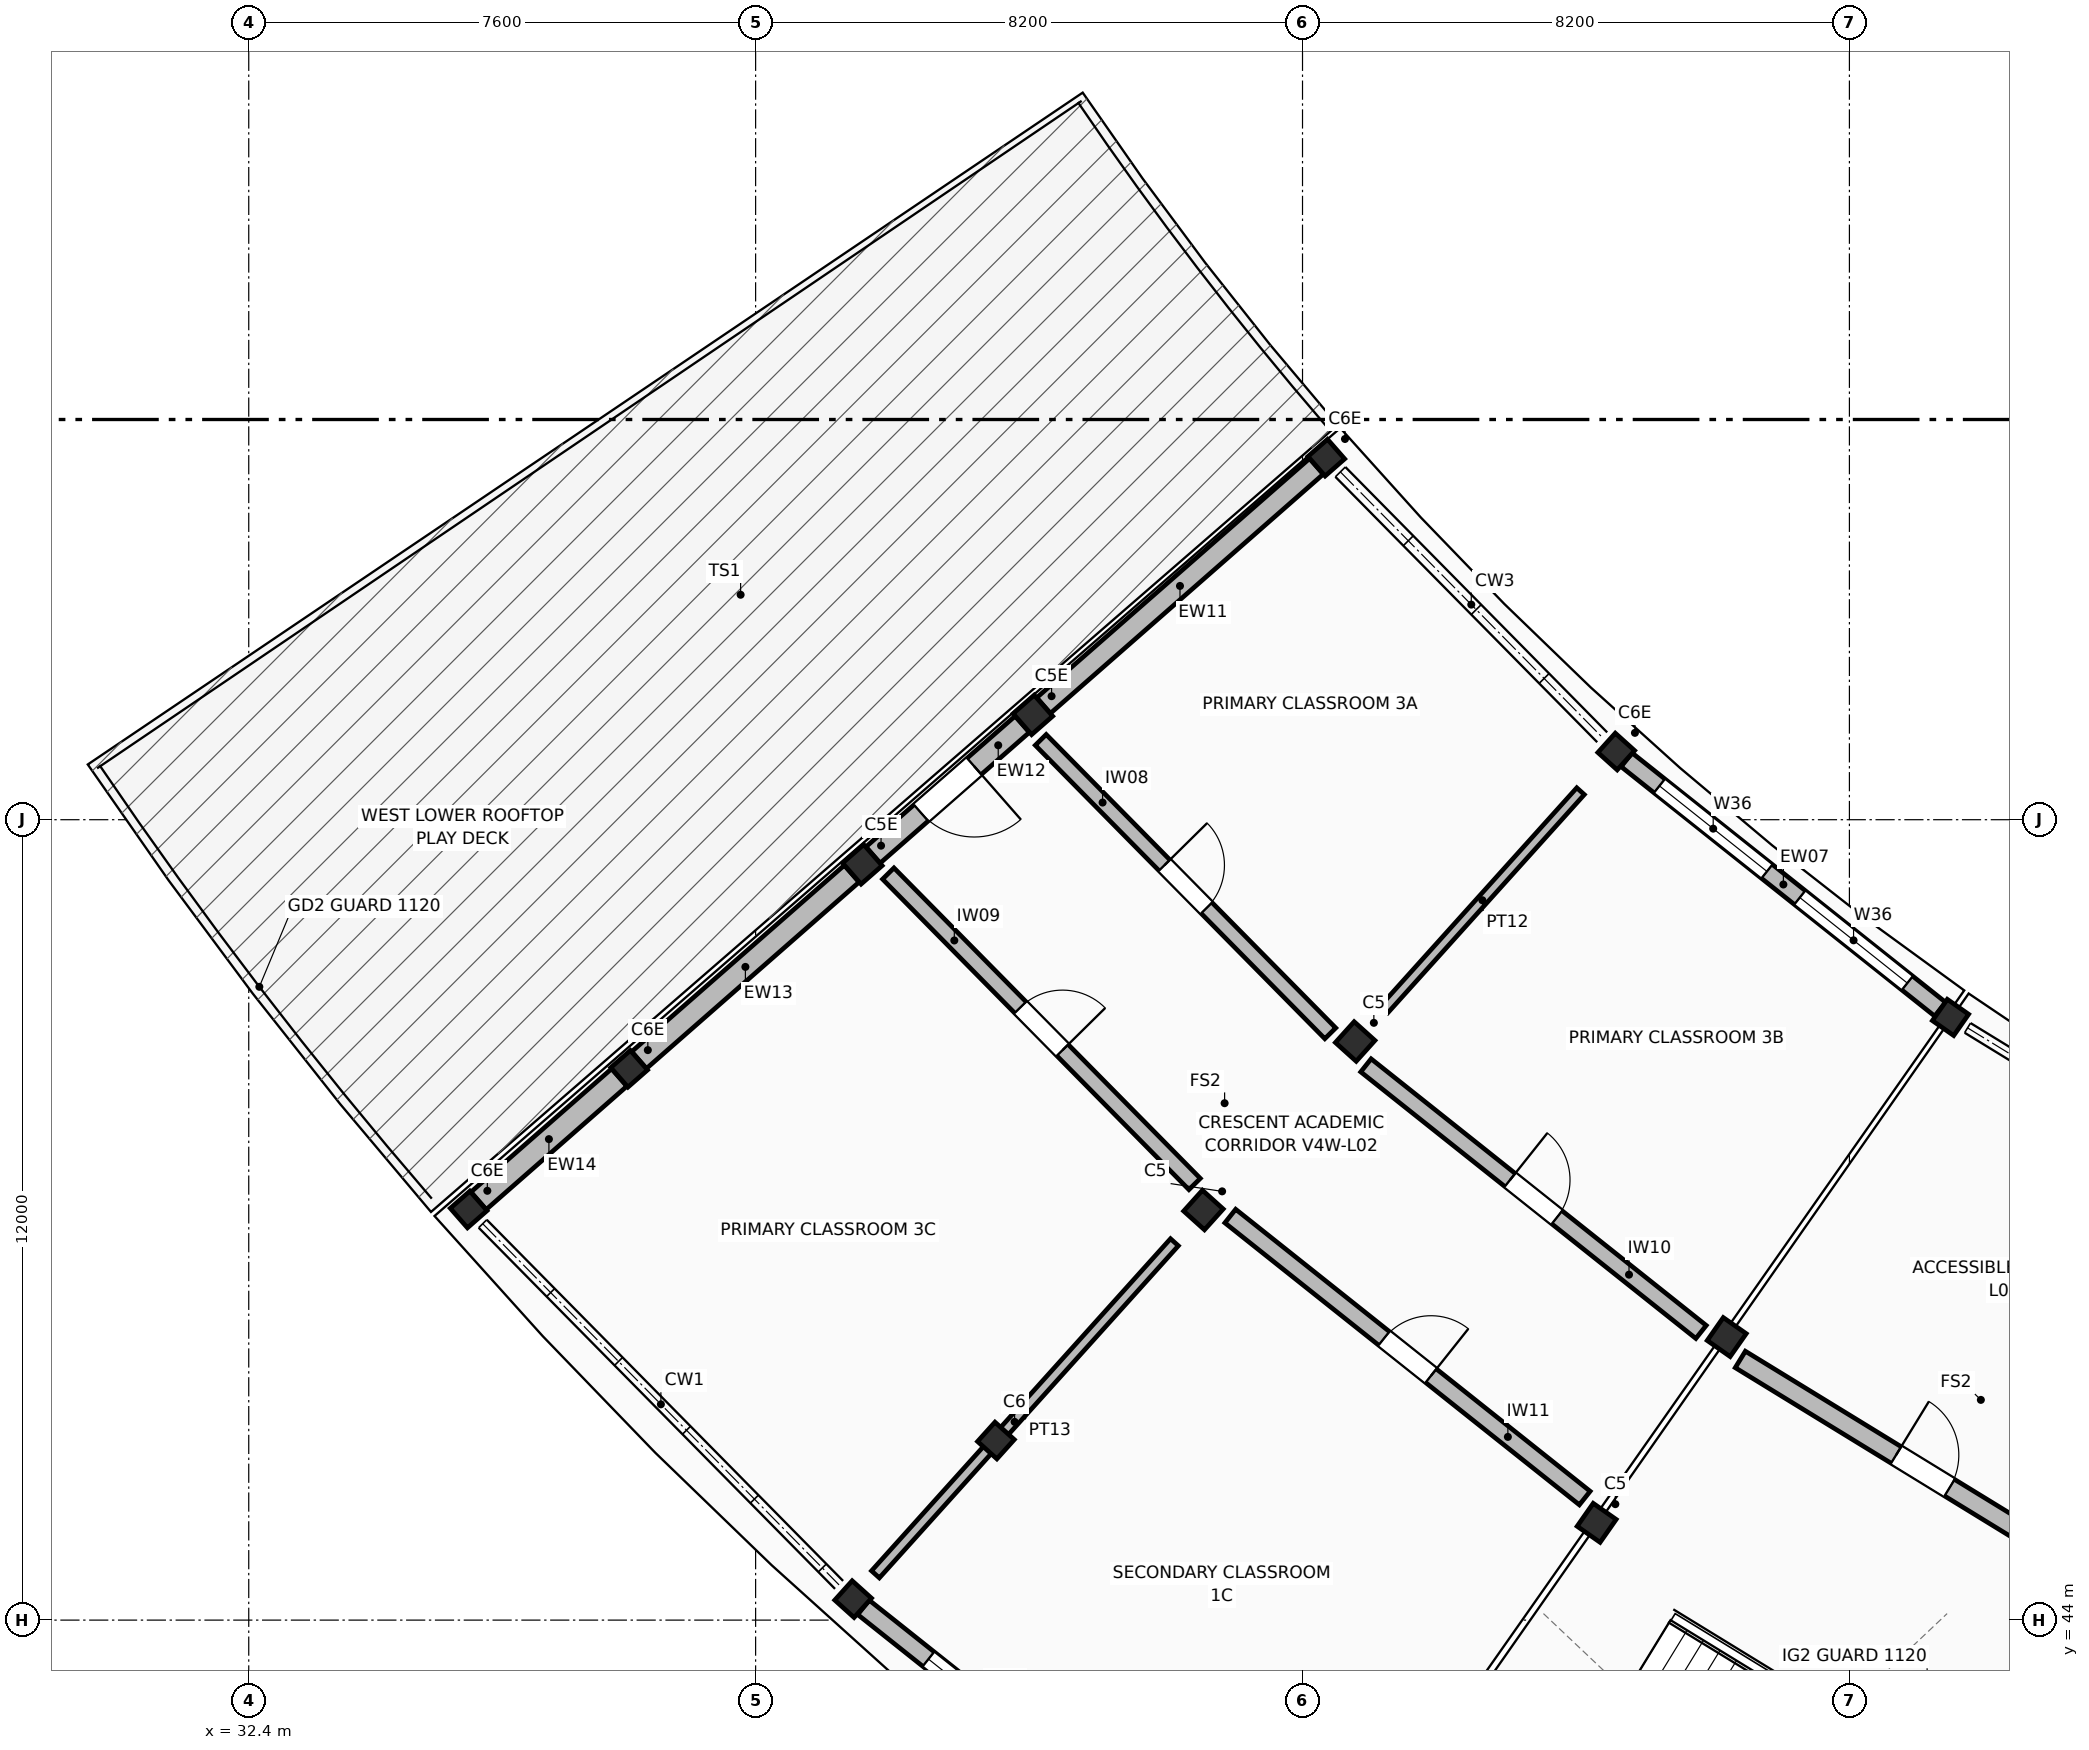
"""IFC4 building model, lengths in metres.
Left out: names, types, materials, properties, quantities, classifications, styles, units other than length and angle.
Written with IfcOpenShell. Run it as: python <this file> out.ifc"""

import sys

from ifc_helpers import new_model, si_unit, direction, frame, frame_2d, origin, origin_2d, place, context, subcontext, project, spatial, rectangle, extrude, element, fill, save


model = new_model("IFC4")
c1 = context("Model", 3, precision=1e-05, world=origin(), true_north=direction((0.0, 1.0)))
c2 = subcontext(c1, "Body", "Model", "MODEL_VIEW")
j1 = project(units=[si_unit("LENGTHUNIT", "METRE"), si_unit("PLANEANGLEUNIT", "RADIAN")], contexts=[c1])
p1 = place(None, origin())
s1 = spatial("IfcSite", under=j1, at=p1, CompositionType="ELEMENT")
p2 = place(p1, origin())
s2 = spatial("IfcBuilding", under=s1, at=p2, CompositionType="ELEMENT")
p3 = place(p2, frame((0.0, 0.0, 8.16)))
s3 = spatial("IfcBuildingStorey", under=s2, at=p3, CompositionType="ELEMENT", Elevation=8.16)
p4 = place(p3, frame((48.557, 61.428, 0.0), z_axis=(0.0, 0.0, 1.0), x_axis=(-0.752069916777, -0.659083333334, 0.0)))
e1 = element("IfcColumn", 1, at=p4, inside=s3, PredefinedType="COLUMN", context=c2, shape_type="SweptSolid", body=[
    extrude(rectangle(XDim=0.39, YDim=0.39, at=origin_2d()), origin(), (0.0, 0.0, 1.0), 3.74),
])
for number, where, z_axis, x_axis in (
    (2, (44.157, 57.572, 0.0), (0.0, 0.0, 1.0), (-0.752, -0.659, 0.0)),
    (3, (41.601, 55.331, 0.0), (0.0, 0.0, 1.0), (-0.752, -0.659, 0.0)),
):
    element("IfcColumn", number, at=place(p3, frame(where, z_axis=z_axis, x_axis=x_axis)), inside=s3, PredefinedType="COLUMN", context=c2, shape_type="SweptSolid", body=[
        extrude(rectangle(XDim=0.42, YDim=0.42, at=origin_2d()), origin(), (0.0, 0.0, 1.0), 3.74),
    ])
for number, where, z_axis, x_axis in (
    (4, (38.104, 52.266, 0.0), (0.0, 0.0, 1.0), (-0.752, -0.659, 0.0)),
    (5, (35.698, 50.156, 0.0), (0.0, 0.0, 1.0), (-0.752, -0.659, 0.0)),
    (6, (52.904, 57.022, 0.0), (0.0, 0.0, 1.0), (-0.669, -0.743, 0.0)),
):
    element("IfcColumn", number, at=place(p3, frame(where, z_axis=z_axis, x_axis=x_axis)), inside=s3, PredefinedType="COLUMN", context=c2, shape_type="SweptSolid", body=[
        extrude(rectangle(XDim=0.39, YDim=0.39, at=origin_2d()), origin(), (0.0, 0.0, 1.0), 3.74),
    ])
for number, where, z_axis, x_axis in (
    (7, (48.99, 52.675, 0.0), (0.0, 0.0, 1.0), (-0.669, -0.743, 0.0)),
    (8, (46.715, 50.148, 0.0), (0.0, 0.0, 1.0), (-0.669, -0.743, 0.0)),
):
    element("IfcColumn", number, at=place(p3, frame(where, z_axis=z_axis, x_axis=x_axis)), inside=s3, PredefinedType="COLUMN", context=c2, shape_type="SweptSolid", body=[
        extrude(rectangle(XDim=0.42, YDim=0.42, at=origin_2d()), origin(), (0.0, 0.0, 1.0), 3.74),
    ])
for number, where, z_axis, x_axis in (
    (9, (43.603, 46.692, 0.0), (0.0, 0.0, 1.0), (-0.669, -0.743, 0.0)),
    (10, (41.462, 44.314, 0.0), (0.0, 0.0, 1.0), (-0.669, -0.743, 0.0)),
    (11, (57.916, 53.035, 0.0), (0.0, 0.0, 1.0), (-0.574, -0.819, 0.0)),
):
    element("IfcColumn", number, at=place(p3, frame(where, z_axis=z_axis, x_axis=x_axis)), inside=s3, PredefinedType="COLUMN", context=c2, shape_type="SweptSolid", body=[
        extrude(rectangle(XDim=0.39, YDim=0.39, at=origin_2d()), origin(), (0.0, 0.0, 1.0), 3.74),
    ])
for number, where, z_axis, x_axis in (
    (12, (54.561, 48.243, 0.0), (0.0, 0.0, 1.0), (-0.574, -0.819, 0.0)),
    (13, (52.61, 45.458, 0.0), (0.0, 0.0, 1.0), (-0.574, -0.819, 0.0)),
):
    element("IfcColumn", number, at=place(p3, frame(where, z_axis=z_axis, x_axis=x_axis)), inside=s3, PredefinedType="COLUMN", context=c2, shape_type="SweptSolid", body=[
        extrude(rectangle(XDim=0.42, YDim=0.42, at=origin_2d()), origin(), (0.0, 0.0, 1.0), 3.74),
    ])
p5 = place(p3, frame((53.059, 56.899, 0.0), z_axis=(0.0, 0.0, 1.0), x_axis=(0.78261410235, -0.622507162049, 0.0)))
e14 = element("IfcWall", 14, at=p5, inside=s3, PredefinedType="STANDARD", context=c2, shape_type="SweptSolid", body=[
    extrude(rectangle(XDim=6.008, YDim=0.264, at=frame_2d((3.004, 0.0))), origin(), (0.0, 0.0, 1.0), 2.78),
])
p6 = place(p5, frame((0.629, 0.0, 0.95)))
e15 = element("IfcOpeningElement", 15, at=p6, cuts=e14, PredefinedType="OPENING", context=c2, shape_type="SweptSolid", body=[
    extrude(rectangle(XDim=2.06, YDim=1.6, at=frame_2d((1.03, 0.8))), frame((0.0, 0.142, 0.0), z_axis=(0.0, -1.0, 0.0), x_axis=(1.0, 0.0, 0.0)), (0.0, 0.0, 1.0), 0.284),
])
p7 = place(p5, frame((3.319, 0.0, 0.95)))
e16 = element("IfcOpeningElement", 16, at=p7, cuts=e14, PredefinedType="OPENING", context=c2, shape_type="SweptSolid", body=[
    extrude(rectangle(XDim=2.06, YDim=1.6, at=frame_2d((1.03, 0.8))), frame((0.0, 0.142, 0.0), z_axis=(0.0, -1.0, 0.0), x_axis=(1.0, 0.0, 0.0)), (0.0, 0.0, 1.0), 0.284),
])
p8 = place(p3, frame((41.617, 44.191, 0.0), z_axis=(0.0, 0.0, 1.0), x_axis=(0.782610403329, -0.62251181242, 0.0)))
e17 = element("IfcWall", 17, at=p8, inside=s3, PredefinedType="STANDARD", context=c2, shape_type="SweptSolid", body=[
    extrude(rectangle(XDim=8.096, YDim=0.276, at=frame_2d((4.048, 0.0))), origin(), (0.0, 0.0, 1.0), 2.78),
])
p9 = place(p8, frame((1.245, 0.0, 0.95)))
e18 = element("IfcOpeningElement", 18, at=p9, cuts=e17, PredefinedType="OPENING", context=c2, shape_type="SweptSolid", body=[
    extrude(rectangle(XDim=2.18, YDim=1.15, at=frame_2d((1.09, 0.575))), frame((0.0, 0.148, 0.0), z_axis=(0.0, -1.0, 0.0), x_axis=(1.0, 0.0, 0.0)), (0.0, 0.0, 1.0), 0.296),
])
p10 = place(p8, frame((4.671, 0.0, 0.95)))
e19 = element("IfcOpeningElement", 19, at=p10, cuts=e17, PredefinedType="OPENING", context=c2, shape_type="SweptSolid", body=[
    extrude(rectangle(XDim=2.18, YDim=1.15, at=frame_2d((1.09, 0.575))), frame((0.0, 0.148, 0.0), z_axis=(0.0, -1.0, 0.0), x_axis=(1.0, 0.0, 0.0)), (0.0, 0.0, 1.0), 0.296),
])
p11 = place(p3, frame((48.408, 61.297, 0.0), z_axis=(0.0, 0.0, 1.0), x_axis=(-0.752014754072, -0.65914627334, 0.0)))
e20 = element("IfcWall", 20, at=p11, inside=s3, PredefinedType="STANDARD", context=c2, shape_type="SweptSolid", body=[
    extrude(rectangle(XDim=5.439, YDim=0.312, at=frame_2d((2.72, 0.0))), origin(), (0.0, 0.0, 1.0), 2.78),
])
p12 = place(p3, frame((43.997, 57.431, 0.0), z_axis=(0.0, 0.0, 1.0), x_axis=(-0.751966127371, -0.659201747029, 0.0)))
e21 = element("IfcWall", 21, at=p12, inside=s3, PredefinedType="STANDARD", context=c2, shape_type="SweptSolid", body=[
    extrude(rectangle(XDim=2.974, YDim=0.324, at=frame_2d((1.487, 0.0))), origin(), (0.0, 0.0, 1.0), 2.78),
])
p13 = place(p12, frame((0.957, 0.0, 0.0)))
e22 = element("IfcOpeningElement", 22, at=p13, cuts=e21, PredefinedType="OPENING", context=c2, shape_type="SweptSolid", body=[
    extrude(rectangle(XDim=1.06, YDim=2.18, at=frame_2d((0.53, 1.09))), frame((0.0, 0.172, 0.0), z_axis=(0.0, -1.0, 0.0), x_axis=(1.0, 0.0, 0.0)), (0.0, 0.0, 1.0), 0.344),
])
p14 = place(p3, frame((41.44, 55.19, 0.0), z_axis=(0.0, 0.0, 1.0), x_axis=(-0.752030548673, -0.659128252969, 0.0)))
e23 = element("IfcWall", 23, at=p14, inside=s3, PredefinedType="STANDARD", context=c2, shape_type="SweptSolid", body=[
    extrude(rectangle(XDim=4.239, YDim=0.336, at=frame_2d((2.119, 0.0))), origin(), (0.0, 0.0, 1.0), 2.78),
])
p15 = place(p3, frame((37.955, 52.135, 0.0), z_axis=(0.0, 0.0, 1.0), x_axis=(-0.752031665926, -0.65912697824, 0.0)))
e24 = element("IfcWall", 24, at=p15, inside=s3, PredefinedType="STANDARD", context=c2, shape_type="SweptSolid", body=[
    extrude(rectangle(XDim=2.804, YDim=0.348, at=frame_2d((1.402, 0.0))), origin(), (0.0, 0.0, 1.0), 2.78),
])
p16 = place(p3, frame((44.275, 57.197, 0.0), z_axis=(0.0, 0.0, 1.0), x_axis=(0.702370898593, -0.7118111553, 0.0)))
e25 = element("IfcWall", 25, at=p16, inside=s3, PredefinedType="STANDARD", context=c2, shape_type="SweptSolid", body=[
    extrude(rectangle(XDim=6.181, YDim=0.23, at=frame_2d((3.09, 0.0))), origin(), (0.0, 0.0, 1.0), 2.75),
])
p17 = place(p16, frame((2.64, 0.0, 0.0)))
e26 = element("IfcOpeningElement", 26, at=p17, cuts=e25, PredefinedType="OPENING", context=c2, shape_type="SweptSolid", body=[
    extrude(rectangle(XDim=0.9, YDim=2.06, at=frame_2d((0.45, 1.03))), frame((0.0, 0.125, 0.0), z_axis=(0.0, -1.0, 0.0), x_axis=(1.0, 0.0, 0.0)), (0.0, 0.0, 1.0), 0.25),
])
p18 = place(p3, frame((41.989, 55.193, 0.0), z_axis=(0.0, 0.0, 1.0), x_axis=(0.702368484449, -0.711813537419, 0.0)))
e27 = element("IfcWall", 27, at=p18, inside=s3, PredefinedType="STANDARD", context=c2, shape_type="SweptSolid", body=[
    extrude(rectangle(XDim=6.54, YDim=0.24, at=frame_2d((3.27, 0.0))), origin(), (0.0, 0.0, 1.0), 2.75),
])
p19 = place(p18, frame((2.82, 0.0, 0.0)))
e28 = element("IfcOpeningElement", 28, at=p19, cuts=e27, PredefinedType="OPENING", context=c2, shape_type="SweptSolid", body=[
    extrude(rectangle(XDim=0.9, YDim=2.12, at=frame_2d((0.45, 1.06))), frame((0.0, 0.13, 0.0), z_axis=(0.0, -1.0, 0.0), x_axis=(1.0, 0.0, 0.0)), (0.0, 0.0, 1.0), 0.26),
])
p20 = place(p3, frame((49.151, 52.317, 0.0), z_axis=(0.0, 0.0, 1.0), x_axis=(0.782605685559, -0.622517743467, 0.0)))
e29 = element("IfcWall", 29, at=p20, inside=s3, PredefinedType="STANDARD", context=c2, shape_type="SweptSolid", body=[
    extrude(rectangle(XDim=6.42, YDim=0.25, at=frame_2d((3.21, 0.0))), origin(), (0.0, 0.0, 1.0), 2.75),
])
p21 = place(p20, frame((2.76, 0.0, 0.0)))
e30 = element("IfcOpeningElement", 30, at=p21, cuts=e29, PredefinedType="OPENING", context=c2, shape_type="SweptSolid", body=[
    extrude(rectangle(XDim=0.9, YDim=2.18, at=frame_2d((0.45, 1.09))), frame((0.0, 0.135, 0.0), z_axis=(0.0, -1.0, 0.0), x_axis=(1.0, 0.0, 0.0)), (0.0, 0.0, 1.0), 0.27),
])
p22 = place(p3, frame((47.117, 50.058, 0.0), z_axis=(0.0, 0.0, 1.0), x_axis=(0.782615780998, -0.622505051653, 0.0)))
e31 = element("IfcWall", 31, at=p22, inside=s3, PredefinedType="STANDARD", context=c2, shape_type="SweptSolid", body=[
    extrude(rectangle(XDim=6.792, YDim=0.26, at=frame_2d((3.396, 0.0))), origin(), (0.0, 0.0, 1.0), 2.75),
])
p23 = place(p22, frame((2.946, 0.0, 0.0)))
e32 = element("IfcOpeningElement", 32, at=p23, cuts=e31, PredefinedType="OPENING", context=c2, shape_type="SweptSolid", body=[
    extrude(rectangle(XDim=0.9, YDim=2.24, at=frame_2d((0.45, 1.12))), frame((0.0, 0.14, 0.0), z_axis=(0.0, -1.0, 0.0), x_axis=(1.0, 0.0, 0.0)), (0.0, 0.0, 1.0), 0.28),
])
p24 = place(p3, frame((52.369, 56.427, 0.0), z_axis=(0.0, 0.0, 1.0), x_axis=(-0.669157836149, -0.743120306761, 0.0)))
e33 = element("IfcWall", 33, at=p24, inside=s3, PredefinedType="PARTITIONING", context=c2, shape_type="SweptSolid", body=[
    extrude(rectangle(XDim=4.4, YDim=0.152, at=frame_2d((2.2, 0.0))), origin(), (0.0, 0.0, 1.0), 2.75),
])
p25 = place(p3, frame((46.28, 49.665, 0.0), z_axis=(0.0, 0.0, 1.0), x_axis=(-0.669115705072, -0.743158242386, 0.0)))
e34 = element("IfcWall", 34, at=p25, inside=s3, PredefinedType="PARTITIONING", context=c2, shape_type="SweptSolid", body=[
    extrude(rectangle(XDim=6.7, YDim=0.158, at=frame_2d((3.35, 0.0))), origin(), (0.0, 0.0, 1.0), 2.75),
])
p26 = place(p3, frame((54.764, 47.908, 0.0), z_axis=(0.0, 0.0, 1.0), x_axis=(0.852626937867, -0.522520147767, 0.0)))
e35 = element("IfcWall", 35, at=p26, inside=s3, PredefinedType="STANDARD", context=c2, shape_type="SweptSolid", body=[
    extrude(rectangle(XDim=6.42, YDim=0.29, at=frame_2d((3.21, 0.0))), origin(), (0.0, 0.0, 1.0), 2.75),
])
p27 = place(p26, frame((2.74, 0.0, 0.0)))
e36 = element("IfcOpeningElement", 36, at=p27, cuts=e35, PredefinedType="OPENING", context=c2, shape_type="SweptSolid", body=[
    extrude(rectangle(XDim=0.94, YDim=2.06, at=frame_2d((0.47, 1.03))), frame((0.0, 0.155, 0.0), z_axis=(0.0, -1.0, 0.0), x_axis=(1.0, 0.0, 0.0)), (0.0, 0.0, 1.0), 0.31),
])
p28 = place(p6, origin())
e37 = element("IfcWindow", 37, at=p28, inside=s3, PartitioningType="SINGLE_PANEL", PredefinedType="WINDOW", context=c2, shape_type="SweptSolid", body=[
    extrude(rectangle(XDim=2.06, YDim=1.6, at=frame_2d((1.03, 0.8))), frame((0.0, 0.03, 0.0), z_axis=(0.0, -1.0, 0.0), x_axis=(1.0, 0.0, 0.0)), (0.0, 0.0, 1.0), 0.06),
])
fill(e15, e37)
p29 = place(p7, origin())
e38 = element("IfcWindow", 38, at=p29, inside=s3, PartitioningType="SINGLE_PANEL", PredefinedType="WINDOW", context=c2, shape_type="SweptSolid", body=[
    extrude(rectangle(XDim=2.06, YDim=1.6, at=frame_2d((1.03, 0.8))), frame((0.0, 0.03, 0.0), z_axis=(0.0, -1.0, 0.0), x_axis=(1.0, 0.0, 0.0)), (0.0, 0.0, 1.0), 0.06),
])
fill(e16, e38)
p30 = place(p9, origin())
e39 = element("IfcWindow", 39, at=p30, inside=s3, PartitioningType="SINGLE_PANEL", PredefinedType="WINDOW", context=c2, shape_type="SweptSolid", body=[
    extrude(rectangle(XDim=2.18, YDim=1.15, at=frame_2d((1.09, 0.575))), frame((0.0, 0.03, 0.0), z_axis=(0.0, -1.0, 0.0), x_axis=(1.0, 0.0, 0.0)), (0.0, 0.0, 1.0), 0.06),
])
fill(e18, e39)
p31 = place(p13, frame((1.06, 0.0, 0.0), z_axis=(0.0, 0.0, 1.0), x_axis=(-1.0, 0.0, 0.0)))
e40 = element("IfcDoor", 40, at=p31, inside=s3, OperationType="SINGLE_SWING_LEFT", PredefinedType="DOOR", context=c2, shape_type="SweptSolid", body=[
    extrude(rectangle(XDim=1.06, YDim=2.18, at=frame_2d((0.53, 1.09))), frame((0.0, 0.025, 0.0), z_axis=(0.0, -1.0, 0.0), x_axis=(1.0, 0.0, 0.0)), (0.0, 0.0, 1.0), 0.05),
])
fill(e22, e40)
p32 = place(p17, frame((0.9, 0.0, 0.0), z_axis=(0.0, 0.0, 1.0), x_axis=(-1.0, 0.0, 0.0)))
e41 = element("IfcDoor", 41, at=p32, inside=s3, OperationType="SINGLE_SWING_LEFT", PredefinedType="DOOR", context=c2, shape_type="SweptSolid", body=[
    extrude(rectangle(XDim=0.9, YDim=2.06, at=frame_2d((0.45, 1.03))), frame((0.0, 0.025, 0.0), z_axis=(0.0, -1.0, 0.0), x_axis=(1.0, 0.0, 0.0)), (0.0, 0.0, 1.0), 0.05),
])
fill(e26, e41)
p33 = place(p19, origin())
e42 = element("IfcDoor", 42, at=p33, inside=s3, OperationType="SINGLE_SWING_RIGHT", PredefinedType="DOOR", context=c2, shape_type="SweptSolid", body=[
    extrude(rectangle(XDim=0.9, YDim=2.12, at=frame_2d((0.45, 1.06))), frame((0.0, 0.025, 0.0), z_axis=(0.0, -1.0, 0.0), x_axis=(1.0, 0.0, 0.0)), (0.0, 0.0, 1.0), 0.05),
])
fill(e28, e42)
p34 = place(p21, frame((0.9, 0.0, 0.0), z_axis=(0.0, 0.0, 1.0), x_axis=(-1.0, 0.0, 0.0)))
e43 = element("IfcDoor", 43, at=p34, inside=s3, OperationType="SINGLE_SWING_LEFT", PredefinedType="DOOR", context=c2, shape_type="SweptSolid", body=[
    extrude(rectangle(XDim=0.9, YDim=2.18, at=frame_2d((0.45, 1.09))), frame((0.0, 0.025, 0.0), z_axis=(0.0, -1.0, 0.0), x_axis=(1.0, 0.0, 0.0)), (0.0, 0.0, 1.0), 0.05),
])
fill(e30, e43)
p35 = place(p23, origin())
e44 = element("IfcDoor", 44, at=p35, inside=s3, OperationType="SINGLE_SWING_RIGHT", PredefinedType="DOOR", context=c2, shape_type="SweptSolid", body=[
    extrude(rectangle(XDim=0.9, YDim=2.24, at=frame_2d((0.45, 1.12))), frame((0.0, 0.025, 0.0), z_axis=(0.0, -1.0, 0.0), x_axis=(1.0, 0.0, 0.0)), (0.0, 0.0, 1.0), 0.05),
])
fill(e32, e44)
p36 = place(p27, frame((0.94, 0.0, 0.0), z_axis=(0.0, 0.0, 1.0), x_axis=(-1.0, 0.0, 0.0)))
e45 = element("IfcDoor", 45, at=p36, inside=s3, OperationType="SINGLE_SWING_LEFT", PredefinedType="DOOR", context=c2, shape_type="SweptSolid", body=[
    extrude(rectangle(XDim=0.94, YDim=2.06, at=frame_2d((0.47, 1.03))), frame((0.0, 0.025, 0.0), z_axis=(0.0, -1.0, 0.0), x_axis=(1.0, 0.0, 0.0)), (0.0, 0.0, 1.0), 0.05),
])
fill(e36, e45)
save(model, sys.argv[1])
